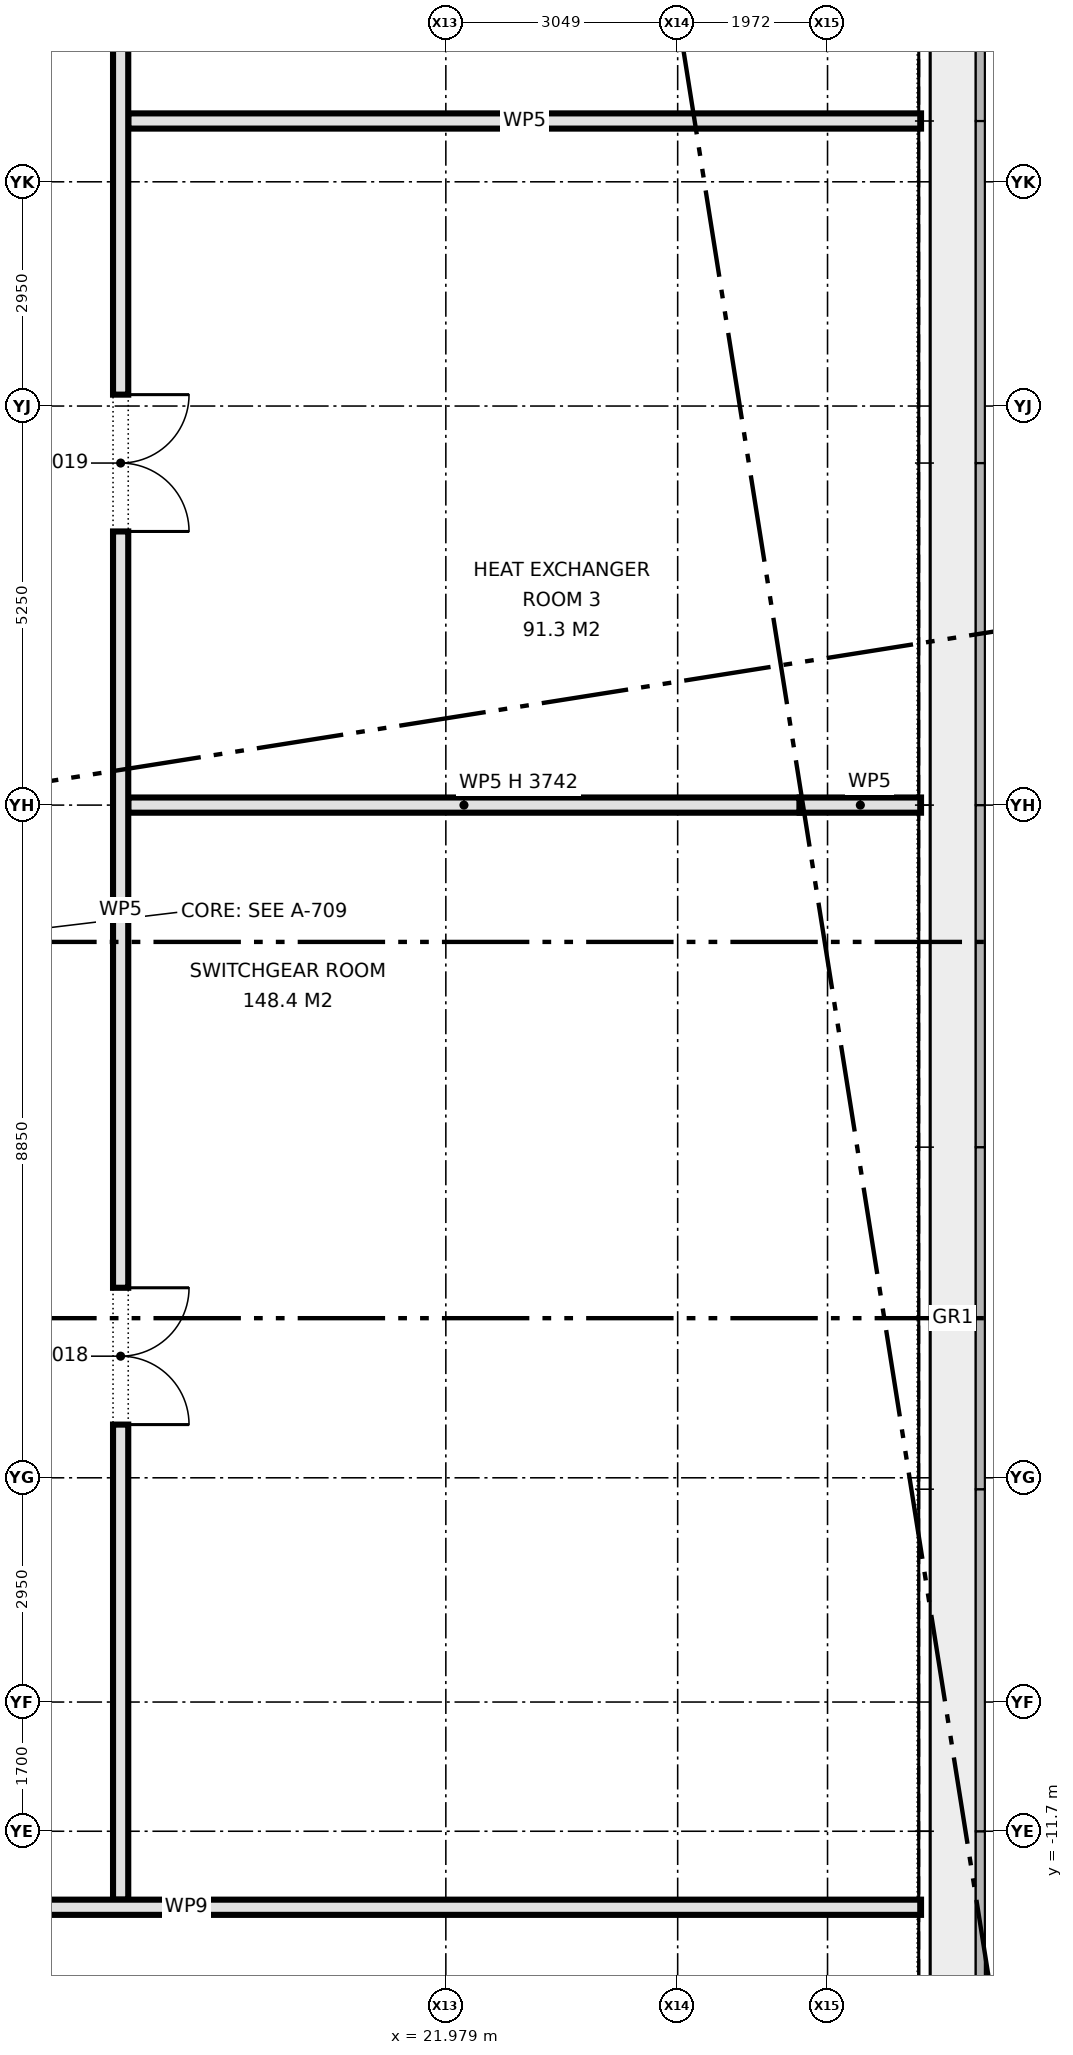
"""IFC4 building model, lengths in metres.
Left out: names, types, materials, properties, quantities, classifications, styles, units other than length and angle.
Written with IfcOpenShell. Run it as: python <this file> out.ifc"""

import sys

from ifc_helpers import new_model, si_unit, direction, frame, frame_2d, origin, place, context, subcontext, project, spatial, rectangle, extrude, element, fill, save


model = new_model("IFC4")
c1 = context("Model", 3, precision=1e-05, world=origin(), true_north=direction((0.0, 1.0)))
c2 = subcontext(c1, "Body", "Model", "MODEL_VIEW")
j1 = project(units=[si_unit("LENGTHUNIT", "METRE"), si_unit("PLANEANGLEUNIT", "RADIAN")], contexts=[c1])
p1 = place(None, origin())
s1 = spatial("IfcSite", under=j1, at=p1, CompositionType="ELEMENT")
p2 = place(p1, origin())
s2 = spatial("IfcBuilding", under=s1, at=p2, CompositionType="ELEMENT")
p3 = place(p2, frame((0.0, 0.0, 120.4)))
s3 = spatial("IfcBuildingStorey", under=s2, at=p3, CompositionType="ELEMENT", Elevation=120.4)
p4 = place(p3, frame((17.8, 1.8, 0.0), z_axis=(0.0, 0.0, 1.0), x_axis=(1.0, 0.0, 0.0)))
e1 = element("IfcWall", 1, at=p4, inside=s3, PredefinedType="PARTITIONING", context=c2, shape_type="SweptSolid", body=[
    extrude(rectangle(XDim=8.833, YDim=0.2, at=frame_2d((4.417, 0.0))), origin(), (0.0, 0.0, 1.0), 3.742),
])
p5 = place(p3, frame((26.633, 1.8, 0.0), z_axis=(0.0, 0.0, 1.0), x_axis=(1.0, 0.0, 0.0)))
e2 = element("IfcWall", 2, at=p5, inside=s3, PredefinedType="PARTITIONING", context=c2, shape_type="SweptSolid", body=[
    extrude(rectangle(XDim=1.597, YDim=0.2, at=frame_2d((0.798, 0.0))), origin(), (0.0, 0.0, 1.0), 4.34),
])
p6 = place(p3, frame((17.8, 10.8, 0.0), z_axis=(0.0, 0.0, 1.0), x_axis=(1.0, 0.0, 0.0)))
e3 = element("IfcWall", 3, at=p6, inside=s3, PredefinedType="PARTITIONING", context=c2, shape_type="SweptSolid", body=[
    extrude(rectangle(XDim=10.43, YDim=0.2, at=frame_2d((5.215, 0.0))), origin(), (0.0, 0.0, 1.0), 4.34),
])
p7 = place(p3, frame((17.7, -12.6, 0.0), z_axis=(0.0, 0.0, 1.0), x_axis=(0.0, 1.0, 0.0)))
e4 = element("IfcWall", 4, at=p7, inside=s3, PredefinedType="PARTITIONING", context=c2, shape_type="SweptSolid", body=[
    extrude(rectangle(XDim=25.2, YDim=0.2, at=frame_2d((12.6, 0.0))), origin(), (0.0, 0.0, 1.0), 4.34),
])
p8 = place(p7, frame((6.25, 0.0, 0.0)))
e5 = element("IfcOpeningElement", 5, at=p8, cuts=e4, PredefinedType="OPENING", context=c2, shape_type="SweptSolid", body=[
    extrude(rectangle(XDim=1.8, YDim=2.1, at=frame_2d((0.9, 1.05))), frame((0.0, 0.11, 0.0), z_axis=(0.0, -1.0, 0.0), x_axis=(1.0, 0.0, 0.0)), (0.0, 0.0, 1.0), 0.22),
])
p9 = place(p7, frame((18.0, 0.0, 0.0)))
e6 = element("IfcOpeningElement", 6, at=p9, cuts=e4, PredefinedType="OPENING", context=c2, shape_type="SweptSolid", body=[
    extrude(rectangle(XDim=1.8, YDim=2.1, at=frame_2d((0.9, 1.05))), frame((0.0, 0.11, 0.0), z_axis=(0.0, -1.0, 0.0), x_axis=(1.0, 0.0, 0.0)), (0.0, 0.0, 1.0), 0.22),
])
p10 = place(p3, frame((8.9, -12.7, 0.0), z_axis=(0.0, 0.0, 1.0), x_axis=(1.0, 0.0, 0.0)))
e7 = element("IfcWall", 7, at=p10, inside=s3, PredefinedType="PARTITIONING", context=c2, shape_type="SweptSolid", body=[
    extrude(rectangle(XDim=19.33, YDim=0.2, at=frame_2d((9.665, 0.0))), origin(), (0.0, 0.0, 1.0), 4.34),
])
p11 = place(p8, frame((1.8, 0.0, 0.0), z_axis=(0.0, 0.0, 1.0), x_axis=(-1.0, 0.0, 0.0)))
e8 = element("IfcDoor", 8, at=p11, inside=s3, OperationType="DOUBLE_DOOR_SINGLE_SWING", PredefinedType="DOOR", context=c2, shape_type="SweptSolid", body=[
    extrude(rectangle(XDim=1.8, YDim=2.1, at=frame_2d((0.9, 1.05))), frame((0.0, 0.025, 0.0), z_axis=(0.0, -1.0, 0.0), x_axis=(1.0, 0.0, 0.0)), (0.0, 0.0, 1.0), 0.05),
])
fill(e5, e8)
p12 = place(p9, frame((1.8, 0.0, 0.0), z_axis=(0.0, 0.0, 1.0), x_axis=(-1.0, 0.0, 0.0)))
e9 = element("IfcDoor", 9, at=p12, inside=s3, OperationType="DOUBLE_DOOR_SINGLE_SWING", PredefinedType="DOOR", context=c2, shape_type="SweptSolid", body=[
    extrude(rectangle(XDim=1.8, YDim=2.1, at=frame_2d((0.9, 1.05))), frame((0.0, 0.025, 0.0), z_axis=(0.0, -1.0, 0.0), x_axis=(1.0, 0.0, 0.0)), (0.0, 0.0, 1.0), 0.05),
])
fill(e6, e9)
save(model, sys.argv[1])
